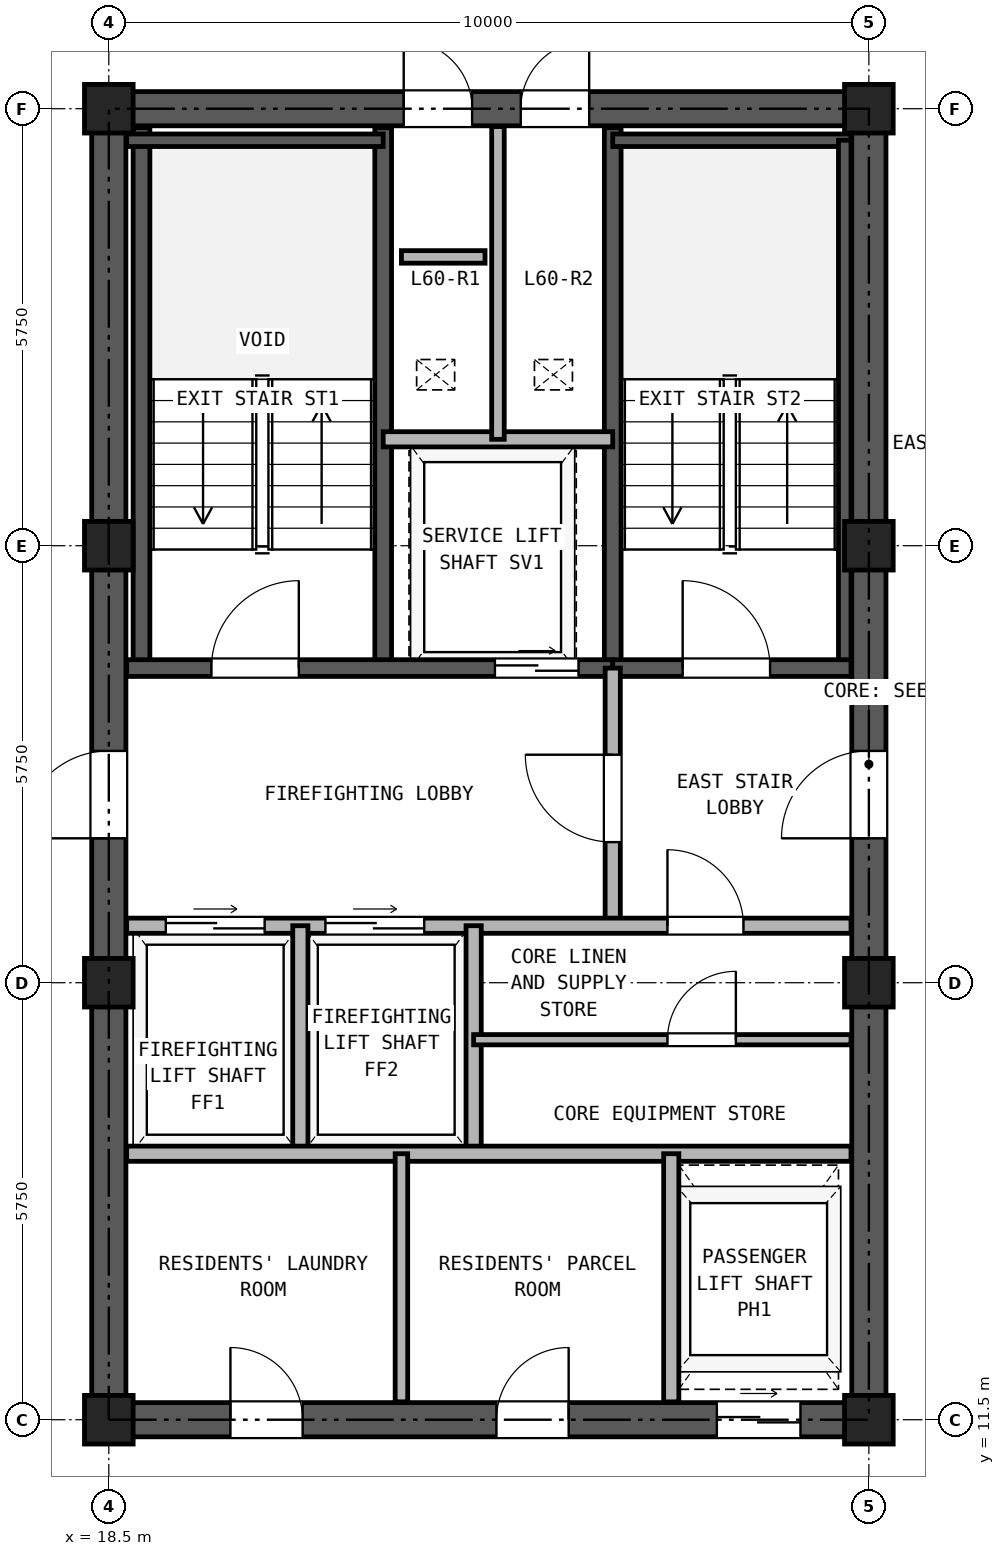
"""IFC4 building model, lengths in metres.
Left out: names, types, materials, properties, quantities, classifications, styles, units other than length and angle.
Written with IfcOpenShell. Run it as: python <this file> out.ifc"""

import sys

from ifc_helpers import new_model, si_unit, direction, frame, frame_2d, origin, origin_2d, place, context, subcontext, project, spatial, rectangle, hollow_rectangle, extrude, source, transform, mapped, element, fill, save


model = new_model("IFC4")
c1 = context("Model", 3, precision=1e-05, world=origin(), true_north=direction((0.0, 1.0)))
c2 = subcontext(c1, "Body", "Model", "MODEL_VIEW")
j1 = project(units=[si_unit("LENGTHUNIT", "METRE"), si_unit("PLANEANGLEUNIT", "RADIAN")], contexts=[c1])
p1 = place(None, origin())
s1 = spatial("IfcSite", under=j1, at=p1, CompositionType="ELEMENT")
p2 = place(p1, origin())
s2 = spatial("IfcBuilding", under=s1, at=p2, CompositionType="ELEMENT")
p3 = place(p2, frame((0.0, 0.0, 212.4)))
s3 = spatial("IfcBuildingStorey", under=s2, at=p3, CompositionType="ELEMENT", Elevation=212.4)
m1 = source(origin(), c2, "Body", "SweptSolid", [
    extrude(hollow_rectangle(XDim=0.64, YDim=0.64, WallThickness=0.035, at=origin_2d()), origin(), (0.0, 0.0, 1.0), 2.84),
])
for number, where, z_axis, x_axis in (
    (1, (18.5, 11.5, 0.0), (0.0, 0.0, 1.0), (1.0, 0.0, 0.0)),
    (2, (18.5, 17.25, 0.0), (0.0, 0.0, 1.0), (1.0, 0.0, 0.0)),
    (3, (18.5, 23.0, 0.0), (0.0, 0.0, 1.0), (1.0, 0.0, 0.0)),
    (4, (18.5, 28.75, 0.0), (0.0, 0.0, 1.0), (1.0, 0.0, 0.0)),
    (5, (28.5, 11.5, 0.0), (0.0, 0.0, 1.0), (1.0, 0.0, 0.0)),
    (6, (28.5, 17.25, 0.0), (0.0, 0.0, 1.0), (1.0, 0.0, 0.0)),
    (7, (28.5, 23.0, 0.0), (0.0, 0.0, 1.0), (1.0, 0.0, 0.0)),
    (8, (28.5, 28.75, 0.0), (0.0, 0.0, 1.0), (1.0, 0.0, 0.0)),
):
    element("IfcColumn", number, at=place(p3, frame(where, z_axis=z_axis, x_axis=x_axis)), inside=s3, PredefinedType="COLUMN", context=c2, shape_type="MappedRepresentation", body=[
        mapped(m1, transform((0.0, 0.0, 0.0), x_axis=(1.0, 0.0, 0.0), y_axis=(0.0, 1.0, 0.0), z_axis=(0.0, 0.0, 1.0), scale=1.0)),
    ])
p4 = place(p3, frame((18.275, 11.5, 0.0), z_axis=(0.0, 0.0, 1.0), x_axis=(1.0, 0.0, 0.0)))
e9 = element("IfcWall", 9, at=p4, inside=s3, PredefinedType="SHEAR", context=c2, shape_type="SweptSolid", body=[
    extrude(rectangle(XDim=10.45, YDim=0.45, at=frame_2d((5.225, 0.0))), origin(), (0.0, 0.0, 1.0), 2.84),
])
p5 = place(p4, frame((1.825, 0.0, 0.0)))
e10 = element("IfcOpeningElement", 10, at=p5, cuts=e9, PredefinedType="OPENING", context=c2, shape_type="SweptSolid", body=[
    extrude(rectangle(XDim=0.95, YDim=2.15, at=frame_2d((0.475, 1.075))), frame((0.0, 0.235, 0.0), z_axis=(0.0, -1.0, 0.0), x_axis=(1.0, 0.0, 0.0)), (0.0, 0.0, 1.0), 0.47),
])
p6 = place(p4, frame((5.325, 0.0, 0.0)))
e11 = element("IfcOpeningElement", 11, at=p6, cuts=e9, PredefinedType="OPENING", context=c2, shape_type="SweptSolid", body=[
    extrude(rectangle(XDim=0.95, YDim=2.15, at=frame_2d((0.475, 1.075))), frame((0.0, 0.235, 0.0), z_axis=(0.0, -1.0, 0.0), x_axis=(1.0, 0.0, 0.0)), (0.0, 0.0, 1.0), 0.47),
])
p7 = place(p4, frame((8.225, 0.0, 0.0)))
e12 = element("IfcOpeningElement", 12, at=p7, cuts=e9, PredefinedType="OPENING", context=c2, shape_type="SweptSolid", body=[
    extrude(rectangle(XDim=1.1, YDim=2.25, at=frame_2d((0.55, 1.125))), frame((0.0, 0.235, 0.0), z_axis=(0.0, -1.0, 0.0), x_axis=(1.0, 0.0, 0.0)), (0.0, 0.0, 1.0), 0.47),
])
p8 = place(p3, frame((18.275, 28.75, 0.0), z_axis=(0.0, 0.0, 1.0), x_axis=(1.0, 0.0, 0.0)))
e13 = element("IfcWall", 13, at=p8, inside=s3, PredefinedType="SHEAR", context=c2, shape_type="SweptSolid", body=[
    extrude(rectangle(XDim=10.45, YDim=0.45, at=frame_2d((5.225, 0.0))), origin(), (0.0, 0.0, 1.0), 2.84),
])
p9 = place(p8, frame((4.105, 0.0, 0.0)))
e14 = element("IfcOpeningElement", 14, at=p9, cuts=e13, PredefinedType="OPENING", context=c2, shape_type="SweptSolid", body=[
    extrude(rectangle(XDim=0.9, YDim=2.05, at=frame_2d((0.45, 1.025))), frame((0.0, 0.235, 0.0), z_axis=(0.0, -1.0, 0.0), x_axis=(1.0, 0.0, 0.0)), (0.0, 0.0, 1.0), 0.47),
])
p10 = place(p8, frame((5.645, 0.0, 0.0)))
e15 = element("IfcOpeningElement", 15, at=p10, cuts=e13, PredefinedType="OPENING", context=c2, shape_type="SweptSolid", body=[
    extrude(rectangle(XDim=0.9, YDim=2.05, at=frame_2d((0.45, 1.025))), frame((0.0, 0.235, 0.0), z_axis=(0.0, -1.0, 0.0), x_axis=(1.0, 0.0, 0.0)), (0.0, 0.0, 1.0), 0.47),
])
p11 = place(p3, frame((18.5, 11.725, 0.0), z_axis=(0.0, 0.0, 1.0), x_axis=(0.0, 1.0, 0.0)))
e16 = element("IfcWall", 16, at=p11, inside=s3, PredefinedType="SHEAR", context=c2, shape_type="SweptSolid", body=[
    extrude(rectangle(XDim=16.8, YDim=0.45, at=frame_2d((8.4, 0.0))), origin(), (0.0, 0.0, 1.0), 2.84),
])
p12 = place(p11, frame((7.425, 0.0, 0.0)))
e17 = element("IfcOpeningElement", 17, at=p12, cuts=e16, PredefinedType="OPENING", context=c2, shape_type="SweptSolid", body=[
    extrude(rectangle(XDim=1.15, YDim=2.2, at=frame_2d((0.575, 1.1))), frame((0.0, 0.235, 0.0), z_axis=(0.0, -1.0, 0.0), x_axis=(1.0, 0.0, 0.0)), (0.0, 0.0, 1.0), 0.47),
])
p13 = place(p3, frame((28.5, 11.725, 0.0), z_axis=(0.0, 0.0, 1.0), x_axis=(0.0, 1.0, 0.0)))
e18 = element("IfcWall", 18, at=p13, inside=s3, PredefinedType="SHEAR", context=c2, shape_type="SweptSolid", body=[
    extrude(rectangle(XDim=16.8, YDim=0.45, at=frame_2d((8.4, 0.0))), origin(), (0.0, 0.0, 1.0), 2.84),
])
p14 = place(p13, frame((7.425, 0.0, 0.0)))
e19 = element("IfcOpeningElement", 19, at=p14, cuts=e18, PredefinedType="OPENING", context=c2, shape_type="SweptSolid", body=[
    extrude(rectangle(XDim=1.15, YDim=2.2, at=frame_2d((0.575, 1.1))), frame((0.0, 0.235, 0.0), z_axis=(0.0, -1.0, 0.0), x_axis=(1.0, 0.0, 0.0)), (0.0, 0.0, 1.0), 0.47),
])
for number, where, z_axis, x_axis in (
    (20, (18.93, 21.39, 0.0), (0.0, 0.0, 1.0), (0.0, 1.0, 0.0)),
    (21, (22.11, 21.39, 0.0), (0.0, 0.0, 1.0), (0.0, 1.0, 0.0)),
    (22, (25.13, 21.39, 0.0), (0.0, 0.0, 1.0), (0.0, 1.0, 0.0)),
):
    element("IfcWall", number, at=place(p3, frame(where, z_axis=z_axis, x_axis=x_axis)), inside=s3, PredefinedType="SOLIDWALL", context=c2, shape_type="SweptSolid", body=[
        extrude(rectangle(XDim=7.11, YDim=0.22, at=frame_2d((3.555, 0.0))), origin(), (0.0, 0.0, 1.0), 2.84),
    ])
p15 = place(p3, frame((18.735, 28.335, 0.0), z_axis=(0.0, 0.0, 1.0), x_axis=(1.0, 0.0, 0.0)))
e23 = element("IfcWall", 23, at=p15, inside=s3, PredefinedType="PARTITIONING", context=c2, shape_type="SweptSolid", body=[
    extrude(rectangle(XDim=3.375, YDim=0.165, at=frame_2d((1.688, 0.0))), origin(), (0.0, 0.0, 1.0), 2.84),
])
p16 = place(p3, frame((25.13, 28.335, 0.0), z_axis=(0.0, 0.0, 1.0), x_axis=(1.0, 0.0, 0.0)))
e24 = element("IfcWall", 24, at=p16, inside=s3, PredefinedType="PARTITIONING", context=c2, shape_type="SweptSolid", body=[
    extrude(rectangle(XDim=3.135, YDim=0.165, at=frame_2d((1.567, 0.0))), origin(), (0.0, 0.0, 1.0), 2.84),
])
p17 = place(p3, frame((28.183, 21.39, 0.0), z_axis=(0.0, 0.0, 1.0), x_axis=(0.0, 1.0, 0.0)))
e25 = element("IfcWall", 25, at=p17, inside=s3, PredefinedType="PARTITIONING", context=c2, shape_type="SweptSolid", body=[
    extrude(rectangle(XDim=6.945, YDim=0.165, at=frame_2d((3.473, 0.0))), origin(), (0.0, 0.0, 1.0), 2.84),
])
p18 = place(p3, frame((18.735, 21.39, 0.0), z_axis=(0.0, 0.0, 1.0), x_axis=(1.0, 0.0, 0.0)))
e26 = element("IfcWall", 26, at=p18, inside=s3, PredefinedType="SOLIDWALL", context=c2, shape_type="SweptSolid", body=[
    extrude(rectangle(XDim=6.395, YDim=0.22, at=frame_2d((3.197, 0.0))), origin(), (0.0, 0.0, 1.0), 2.84),
])
p19 = place(p18, frame((1.115, 0.0, 0.0)))
e27 = element("IfcOpeningElement", 27, at=p19, cuts=e26, PredefinedType="OPENING", context=c2, shape_type="SweptSolid", body=[
    extrude(rectangle(XDim=1.15, YDim=2.2, at=frame_2d((0.575, 1.1))), frame((0.0, 0.12, 0.0), z_axis=(0.0, -1.0, 0.0), x_axis=(1.0, 0.0, 0.0)), (0.0, 0.0, 1.0), 0.24),
])
p20 = place(p18, frame((4.845, 0.0, 0.0)))
e28 = element("IfcOpeningElement", 28, at=p20, cuts=e26, PredefinedType="OPENING", context=c2, shape_type="SweptSolid", body=[
    extrude(rectangle(XDim=1.1, YDim=2.25, at=frame_2d((0.55, 1.125))), frame((0.0, 0.12, 0.0), z_axis=(0.0, -1.0, 0.0), x_axis=(1.0, 0.0, 0.0)), (0.0, 0.0, 1.0), 0.24),
])
p21 = place(p3, frame((25.13, 21.39, 0.0), z_axis=(0.0, 0.0, 1.0), x_axis=(1.0, 0.0, 0.0)))
e29 = element("IfcWall", 29, at=p21, inside=s3, PredefinedType="SOLIDWALL", context=c2, shape_type="SweptSolid", body=[
    extrude(rectangle(XDim=3.135, YDim=0.22, at=frame_2d((1.567, 0.0))), origin(), (0.0, 0.0, 1.0), 2.84),
])
p22 = place(p21, frame((0.92, 0.0, 0.0)))
e30 = element("IfcOpeningElement", 30, at=p22, cuts=e29, PredefinedType="OPENING", context=c2, shape_type="SweptSolid", body=[
    extrude(rectangle(XDim=1.15, YDim=2.2, at=frame_2d((0.575, 1.1))), frame((0.0, 0.12, 0.0), z_axis=(0.0, -1.0, 0.0), x_axis=(1.0, 0.0, 0.0)), (0.0, 0.0, 1.0), 0.24),
])
p23 = place(p3, frame((22.11, 24.4, 0.0), z_axis=(0.0, 0.0, 1.0), x_axis=(1.0, 0.0, 0.0)))
e31 = element("IfcWall", 31, at=p23, inside=s3, PredefinedType="PARTITIONING", context=c2, shape_type="SweptSolid", body=[
    extrude(rectangle(XDim=3.02, YDim=0.2, at=frame_2d((1.51, 0.0))), origin(), (0.0, 0.0, 1.0), 2.84),
])
p24 = place(p3, frame((23.62, 24.4, 0.0), z_axis=(0.0, 0.0, 1.0), x_axis=(0.0, 1.0, 0.0)))
e32 = element("IfcWall", 32, at=p24, inside=s3, PredefinedType="PARTITIONING", context=c2, shape_type="SweptSolid", body=[
    extrude(rectangle(XDim=4.115, YDim=0.165, at=frame_2d((2.058, 0.0))), origin(), (0.0, 0.0, 1.0), 2.84),
])
p25 = place(p3, frame((25.13, 18.0, 0.0), z_axis=(0.0, 0.0, 1.0), x_axis=(0.0, 1.0, 0.0)))
e33 = element("IfcWall", 33, at=p25, inside=s3, PredefinedType="PARTITIONING", context=c2, shape_type="SweptSolid", body=[
    extrude(rectangle(XDim=3.39, YDim=0.2, at=frame_2d((1.695, 0.0))), origin(), (0.0, 0.0, 1.0), 2.84),
])
p26 = place(p25, frame((1.1, 0.0, 0.0)))
e34 = element("IfcOpeningElement", 34, at=p26, cuts=e33, PredefinedType="OPENING", context=c2, shape_type="SweptSolid", body=[
    extrude(rectangle(XDim=1.15, YDim=2.2, at=frame_2d((0.575, 1.1))), frame((0.0, 0.11, 0.0), z_axis=(0.0, -1.0, 0.0), x_axis=(1.0, 0.0, 0.0)), (0.0, 0.0, 1.0), 0.22),
])
p27 = place(p3, frame((18.735, 18.0, 0.0), z_axis=(0.0, 0.0, 1.0), x_axis=(1.0, 0.0, 0.0)))
e35 = element("IfcWall", 35, at=p27, inside=s3, PredefinedType="PARTITIONING", context=c2, shape_type="SweptSolid", body=[
    extrude(rectangle(XDim=9.53, YDim=0.2, at=frame_2d((4.765, 0.0))), origin(), (0.0, 0.0, 1.0), 2.84),
])
p28 = place(p27, frame((0.515, 0.0, 0.0)))
e36 = element("IfcOpeningElement", 36, at=p28, cuts=e35, PredefinedType="OPENING", context=c2, shape_type="SweptSolid", body=[
    extrude(rectangle(XDim=1.3, YDim=2.3, at=frame_2d((0.65, 1.15))), frame((0.0, 0.11, 0.0), z_axis=(0.0, -1.0, 0.0), x_axis=(1.0, 0.0, 0.0)), (0.0, 0.0, 1.0), 0.22),
])
p29 = place(p27, frame((2.615, 0.0, 0.0)))
e37 = element("IfcOpeningElement", 37, at=p29, cuts=e35, PredefinedType="OPENING", context=c2, shape_type="SweptSolid", body=[
    extrude(rectangle(XDim=1.3, YDim=2.3, at=frame_2d((0.65, 1.15))), frame((0.0, 0.11, 0.0), z_axis=(0.0, -1.0, 0.0), x_axis=(1.0, 0.0, 0.0)), (0.0, 0.0, 1.0), 0.22),
])
p30 = place(p27, frame((7.115, 0.0, 0.0)))
e38 = element("IfcOpeningElement", 38, at=p30, cuts=e35, PredefinedType="OPENING", context=c2, shape_type="SweptSolid", body=[
    extrude(rectangle(XDim=1.0, YDim=2.15, at=frame_2d((0.5, 1.075))), frame((0.0, 0.11, 0.0), z_axis=(0.0, -1.0, 0.0), x_axis=(1.0, 0.0, 0.0)), (0.0, 0.0, 1.0), 0.22),
])
for number, where, z_axis, x_axis in (
    (39, (21.02, 15.0, 0.0), (0.0, 0.0, 1.0), (0.0, 1.0, 0.0)),
    (40, (23.3, 15.0, 0.0), (0.0, 0.0, 1.0), (0.0, 1.0, 0.0)),
):
    element("IfcWall", number, at=place(p3, frame(where, z_axis=z_axis, x_axis=x_axis)), inside=s3, PredefinedType="PARTITIONING", context=c2, shape_type="SweptSolid", body=[
        extrude(rectangle(XDim=3.0, YDim=0.2, at=frame_2d((1.5, 0.0))), origin(), (0.0, 0.0, 1.0), 2.84),
    ])
p31 = place(p3, frame((18.735, 15.0, 0.0), z_axis=(0.0, 0.0, 1.0), x_axis=(1.0, 0.0, 0.0)))
e41 = element("IfcWall", 41, at=p31, inside=s3, PredefinedType="PARTITIONING", context=c2, shape_type="SweptSolid", body=[
    extrude(rectangle(XDim=9.53, YDim=0.2, at=frame_2d((4.765, 0.0))), origin(), (0.0, 0.0, 1.0), 2.84),
])
p32 = place(p3, frame((23.3, 16.5, 0.0), z_axis=(0.0, 0.0, 1.0), x_axis=(1.0, 0.0, 0.0)))
e42 = element("IfcWall", 42, at=p32, inside=s3, PredefinedType="PARTITIONING", context=c2, shape_type="SweptSolid", body=[
    extrude(rectangle(XDim=4.965, YDim=0.135, at=frame_2d((2.482, 0.0))), origin(), (0.0, 0.0, 1.0), 2.84),
])
p33 = place(p32, frame((2.55, 0.0, 0.0)))
e43 = element("IfcOpeningElement", 43, at=p33, cuts=e42, PredefinedType="OPENING", context=c2, shape_type="SweptSolid", body=[
    extrude(rectangle(XDim=0.9, YDim=2.05, at=frame_2d((0.45, 1.025))), frame((0.0, 0.077, 0.0), z_axis=(0.0, -1.0, 0.0), x_axis=(1.0, 0.0, 0.0)), (0.0, 0.0, 1.0), 0.155),
])
p34 = place(p3, frame((22.35, 11.735, 0.0), z_axis=(0.0, 0.0, 1.0), x_axis=(0.0, 1.0, 0.0)))
e44 = element("IfcWall", 44, at=p34, inside=s3, PredefinedType="PARTITIONING", context=c2, shape_type="SweptSolid", body=[
    extrude(rectangle(XDim=3.265, YDim=0.165, at=frame_2d((1.632, 0.0))), origin(), (0.0, 0.0, 1.0), 2.84),
])
p35 = place(p3, frame((25.9, 11.735, 0.0), z_axis=(0.0, 0.0, 1.0), x_axis=(0.0, 1.0, 0.0)))
e45 = element("IfcWall", 45, at=p35, inside=s3, PredefinedType="PARTITIONING", context=c2, shape_type="SweptSolid", body=[
    extrude(rectangle(XDim=3.265, YDim=0.2, at=frame_2d((1.632, 0.0))), origin(), (0.0, 0.0, 1.0), 2.84),
])
p36 = place(p3, frame((22.35, 26.8, 0.0), z_axis=(0.0, 0.0, 1.0), x_axis=(1.0, 0.0, 0.0)))
e46 = element("IfcWall", 46, at=p36, inside=s3, PredefinedType="PARTITIONING", context=c2, shape_type="SweptSolid", body=[
    extrude(rectangle(XDim=1.1, YDim=0.165, at=frame_2d((0.55, 0.0))), origin(), (0.0, 0.0, 1.0), 2.84),
])
p37 = place(p19, frame((1.15, 0.0, 0.0), z_axis=(0.0, 0.0, 1.0), x_axis=(-1.0, 0.0, 0.0)))
e47 = element("IfcDoor", 47, at=p37, inside=s3, OperationType="SINGLE_SWING_RIGHT", PredefinedType="DOOR", context=c2, shape_type="SweptSolid", body=[
    extrude(rectangle(XDim=1.15, YDim=2.2, at=frame_2d((0.575, 1.1))), frame((0.0, 0.025, 0.0), z_axis=(0.0, -1.0, 0.0), x_axis=(1.0, 0.0, 0.0)), (0.0, 0.0, 1.0), 0.05),
])
fill(e27, e47)
p38 = place(p22, frame((1.15, 0.0, 0.0), z_axis=(0.0, 0.0, 1.0), x_axis=(-1.0, 0.0, 0.0)))
e48 = element("IfcDoor", 48, at=p38, inside=s3, OperationType="SINGLE_SWING_LEFT", PredefinedType="DOOR", context=c2, shape_type="SweptSolid", body=[
    extrude(rectangle(XDim=1.15, YDim=2.2, at=frame_2d((0.575, 1.1))), frame((0.0, 0.025, 0.0), z_axis=(0.0, -1.0, 0.0), x_axis=(1.0, 0.0, 0.0)), (0.0, 0.0, 1.0), 0.05),
])
fill(e30, e48)
p39 = place(p20, frame((1.1, 0.0, 0.0), z_axis=(0.0, 0.0, 1.0), x_axis=(-1.0, 0.0, 0.0)))
e49 = element("IfcDoor", 49, at=p39, inside=s3, OperationType="DOUBLE_DOOR_SLIDING", PredefinedType="DOOR", context=c2, shape_type="SweptSolid", body=[
    extrude(rectangle(XDim=1.1, YDim=2.25, at=frame_2d((0.55, 1.125))), frame((0.0, 0.025, 0.0), z_axis=(0.0, -1.0, 0.0), x_axis=(1.0, 0.0, 0.0)), (0.0, 0.0, 1.0), 0.05),
])
fill(e28, e49)
p40 = place(p26, origin())
e50 = element("IfcDoor", 50, at=p40, inside=s3, OperationType="SINGLE_SWING_RIGHT", PredefinedType="DOOR", context=c2, shape_type="SweptSolid", body=[
    extrude(rectangle(XDim=1.15, YDim=2.2, at=frame_2d((0.575, 1.1))), frame((0.0, 0.025, 0.0), z_axis=(0.0, -1.0, 0.0), x_axis=(1.0, 0.0, 0.0)), (0.0, 0.0, 1.0), 0.05),
])
fill(e34, e50)
p41 = place(p28, origin())
e51 = element("IfcDoor", 51, at=p41, inside=s3, OperationType="DOUBLE_DOOR_SLIDING", PredefinedType="DOOR", context=c2, shape_type="SweptSolid", body=[
    extrude(rectangle(XDim=1.3, YDim=2.3, at=frame_2d((0.65, 1.15))), frame((0.0, 0.025, 0.0), z_axis=(0.0, -1.0, 0.0), x_axis=(1.0, 0.0, 0.0)), (0.0, 0.0, 1.0), 0.05),
])
fill(e36, e51)
p42 = place(p29, origin())
e52 = element("IfcDoor", 52, at=p42, inside=s3, OperationType="DOUBLE_DOOR_SLIDING", PredefinedType="DOOR", context=c2, shape_type="SweptSolid", body=[
    extrude(rectangle(XDim=1.3, YDim=2.3, at=frame_2d((0.65, 1.15))), frame((0.0, 0.025, 0.0), z_axis=(0.0, -1.0, 0.0), x_axis=(1.0, 0.0, 0.0)), (0.0, 0.0, 1.0), 0.05),
])
fill(e37, e52)
p43 = place(p30, frame((1.0, 0.0, 0.0), z_axis=(0.0, 0.0, 1.0), x_axis=(-1.0, 0.0, 0.0)))
e53 = element("IfcDoor", 53, at=p43, inside=s3, OperationType="SINGLE_SWING_LEFT", PredefinedType="DOOR", context=c2, shape_type="SweptSolid", body=[
    extrude(rectangle(XDim=1.0, YDim=2.15, at=frame_2d((0.5, 1.075))), frame((0.0, 0.025, 0.0), z_axis=(0.0, -1.0, 0.0), x_axis=(1.0, 0.0, 0.0)), (0.0, 0.0, 1.0), 0.05),
])
fill(e38, e53)
p44 = place(p33, frame((0.9, 0.0, 0.0), z_axis=(0.0, 0.0, 1.0), x_axis=(-1.0, 0.0, 0.0)))
e54 = element("IfcDoor", 54, at=p44, inside=s3, OperationType="SINGLE_SWING_RIGHT", PredefinedType="DOOR", context=c2, shape_type="SweptSolid", body=[
    extrude(rectangle(XDim=0.9, YDim=2.05, at=frame_2d((0.45, 1.025))), frame((0.0, 0.025, 0.0), z_axis=(0.0, -1.0, 0.0), x_axis=(1.0, 0.0, 0.0)), (0.0, 0.0, 1.0), 0.05),
])
fill(e43, e54)
p45 = place(p12, frame((1.15, 0.0, 0.0), z_axis=(0.0, 0.0, 1.0), x_axis=(-1.0, 0.0, 0.0)))
e55 = element("IfcDoor", 55, at=p45, inside=s3, OperationType="SINGLE_SWING_LEFT", PredefinedType="DOOR", context=c2, shape_type="SweptSolid", body=[
    extrude(rectangle(XDim=1.15, YDim=2.2, at=frame_2d((0.575, 1.1))), frame((0.0, 0.025, 0.0), z_axis=(0.0, -1.0, 0.0), x_axis=(1.0, 0.0, 0.0)), (0.0, 0.0, 1.0), 0.05),
])
fill(e17, e55)
p46 = place(p14, origin())
e56 = element("IfcDoor", 56, at=p46, inside=s3, OperationType="SINGLE_SWING_LEFT", PredefinedType="DOOR", context=c2, shape_type="SweptSolid", body=[
    extrude(rectangle(XDim=1.15, YDim=2.2, at=frame_2d((0.575, 1.1))), frame((0.0, 0.025, 0.0), z_axis=(0.0, -1.0, 0.0), x_axis=(1.0, 0.0, 0.0)), (0.0, 0.0, 1.0), 0.05),
])
fill(e19, e56)
p47 = place(p9, origin())
e57 = element("IfcDoor", 57, at=p47, inside=s3, OperationType="SINGLE_SWING_LEFT", PredefinedType="DOOR", context=c2, shape_type="SweptSolid", body=[
    extrude(rectangle(XDim=0.9, YDim=2.05, at=frame_2d((0.45, 1.025))), frame((0.0, 0.025, 0.0), z_axis=(0.0, -1.0, 0.0), x_axis=(1.0, 0.0, 0.0)), (0.0, 0.0, 1.0), 0.05),
])
fill(e14, e57)
p48 = place(p10, origin())
e58 = element("IfcDoor", 58, at=p48, inside=s3, OperationType="SINGLE_SWING_RIGHT", PredefinedType="DOOR", context=c2, shape_type="SweptSolid", body=[
    extrude(rectangle(XDim=0.9, YDim=2.05, at=frame_2d((0.45, 1.025))), frame((0.0, 0.025, 0.0), z_axis=(0.0, -1.0, 0.0), x_axis=(1.0, 0.0, 0.0)), (0.0, 0.0, 1.0), 0.05),
])
fill(e15, e58)
p49 = place(p5, frame((0.95, 0.0, 0.0), z_axis=(0.0, 0.0, 1.0), x_axis=(-1.0, 0.0, 0.0)))
e59 = element("IfcDoor", 59, at=p49, inside=s3, OperationType="SINGLE_SWING_LEFT", PredefinedType="DOOR", context=c2, shape_type="SweptSolid", body=[
    extrude(rectangle(XDim=0.95, YDim=2.15, at=frame_2d((0.475, 1.075))), frame((0.0, 0.025, 0.0), z_axis=(0.0, -1.0, 0.0), x_axis=(1.0, 0.0, 0.0)), (0.0, 0.0, 1.0), 0.05),
])
fill(e10, e59)
p50 = place(p6, frame((0.95, 0.0, 0.0), z_axis=(0.0, 0.0, 1.0), x_axis=(-1.0, 0.0, 0.0)))
e60 = element("IfcDoor", 60, at=p50, inside=s3, OperationType="SINGLE_SWING_RIGHT", PredefinedType="DOOR", context=c2, shape_type="SweptSolid", body=[
    extrude(rectangle(XDim=0.95, YDim=2.15, at=frame_2d((0.475, 1.075))), frame((0.0, 0.025, 0.0), z_axis=(0.0, -1.0, 0.0), x_axis=(1.0, 0.0, 0.0)), (0.0, 0.0, 1.0), 0.05),
])
fill(e11, e60)
p51 = place(p7, frame((1.1, 0.0, 0.0), z_axis=(0.0, 0.0, 1.0), x_axis=(-1.0, 0.0, 0.0)))
e61 = element("IfcDoor", 61, at=p51, inside=s3, OperationType="DOUBLE_DOOR_SLIDING", PredefinedType="DOOR", context=c2, shape_type="SweptSolid", body=[
    extrude(rectangle(XDim=1.1, YDim=2.25, at=frame_2d((0.55, 1.125))), frame((0.0, 0.025, 0.0), z_axis=(0.0, -1.0, 0.0), x_axis=(1.0, 0.0, 0.0)), (0.0, 0.0, 1.0), 0.05),
])
fill(e12, e61)
save(model, sys.argv[1])
